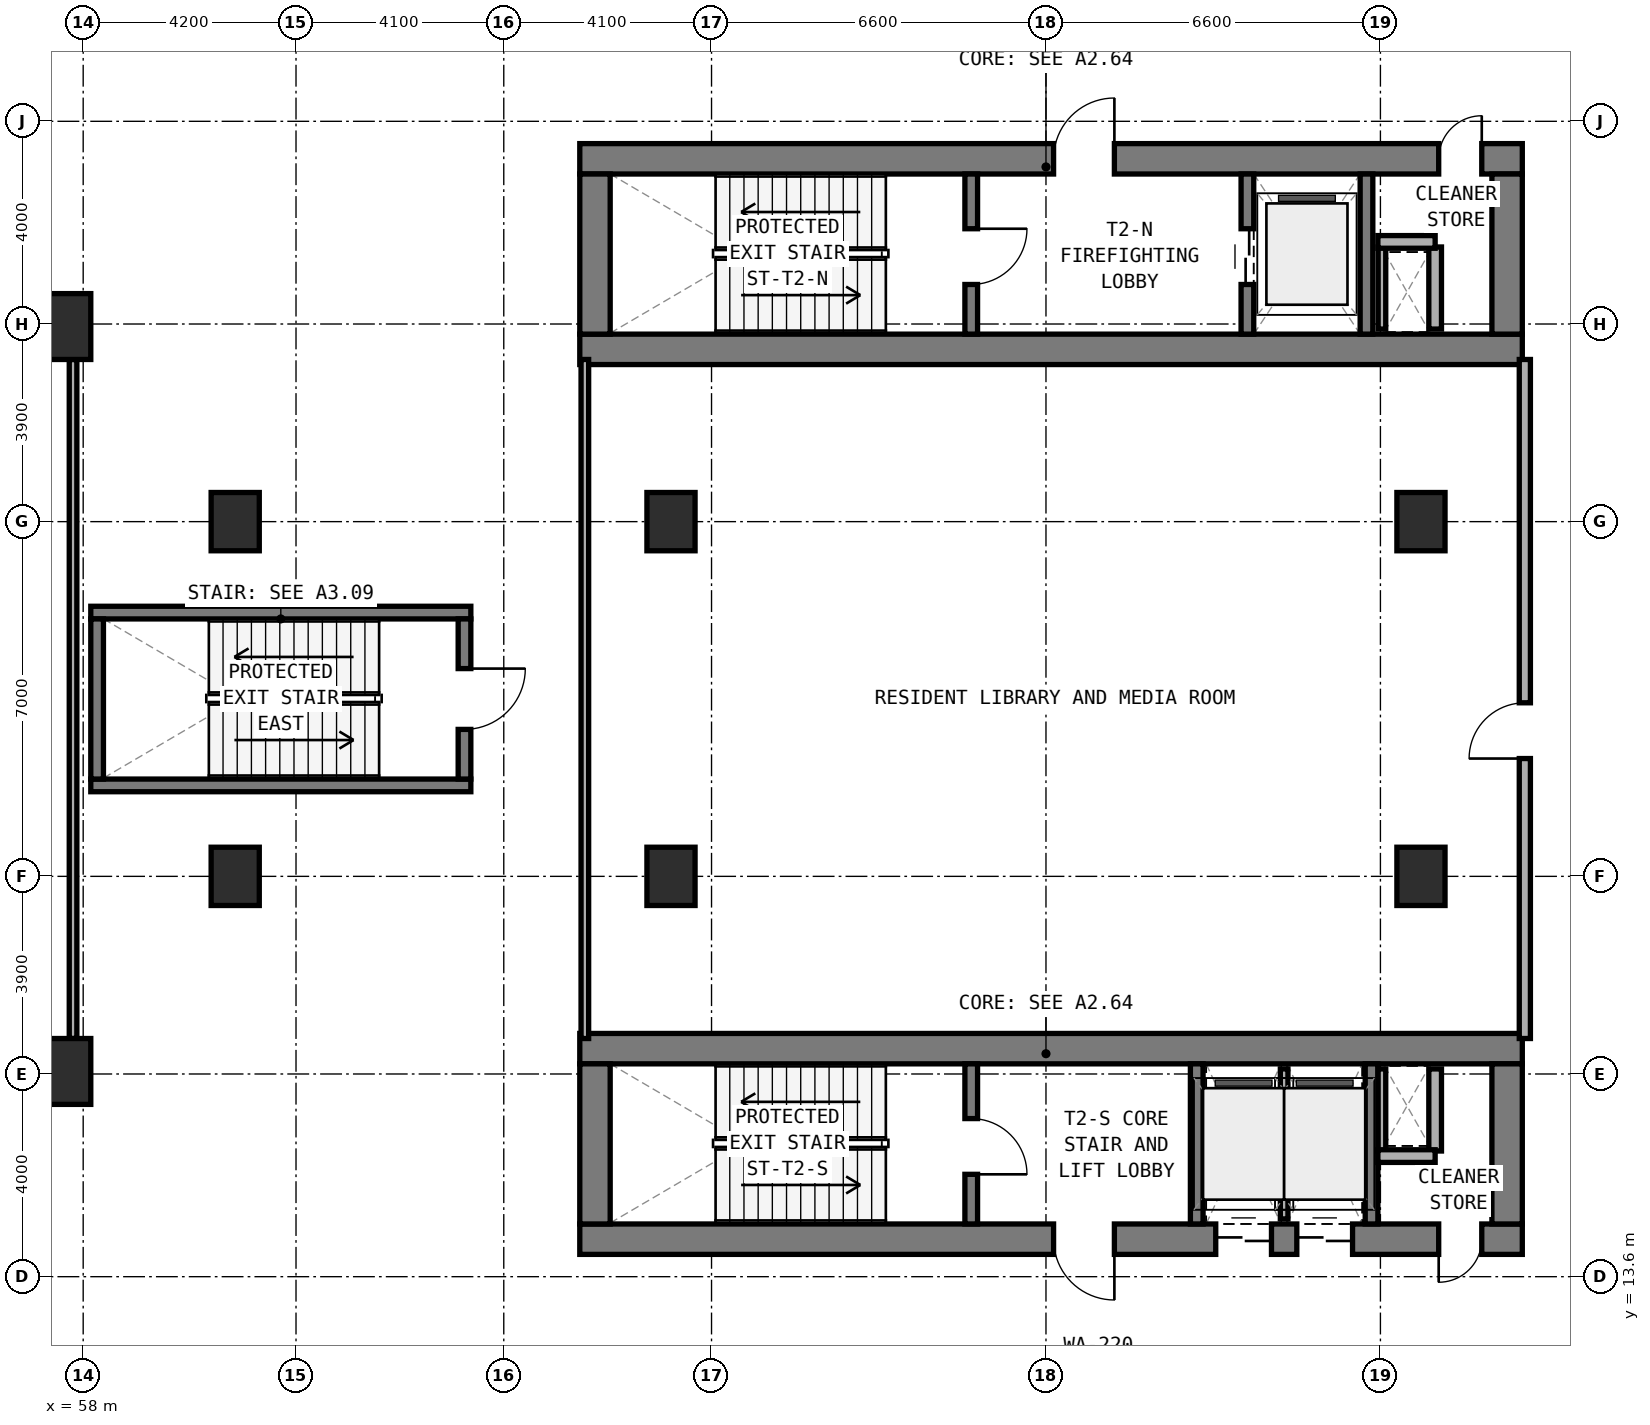
"""IFC4 building model, lengths in metres.
Left out: names, types, materials, properties, quantities, classifications, styles, units other than length and angle.
Written with IfcOpenShell. Run it as: python <this file> out.ifc"""

import sys

from ifc_helpers import new_model, si_unit, direction, frame, frame_2d, origin, origin_2d, place, context, subcontext, project, spatial, rectangle, extrude, element, fill, save


model = new_model("IFC4")
c1 = context("Model", 3, precision=1e-05, world=origin(), true_north=direction((0.0, 1.0)))
c2 = subcontext(c1, "Body", "Model", "MODEL_VIEW")
j1 = project(units=[si_unit("LENGTHUNIT", "METRE"), si_unit("PLANEANGLEUNIT", "RADIAN")], contexts=[c1])
p1 = place(None, origin())
s1 = spatial("IfcSite", under=j1, at=p1, CompositionType="ELEMENT")
p2 = place(p1, origin())
s2 = spatial("IfcBuilding", under=s1, at=p2, CompositionType="ELEMENT")
p3 = place(p2, frame((0.0, 0.0, 15.0)))
s3 = spatial("IfcBuildingStorey", under=s2, at=p3, CompositionType="ELEMENT", Elevation=15.0)
p4 = place(p3, frame((67.8, 31.9, 0.0), z_axis=(0.0, 0.0, 1.0), x_axis=(1.0, 0.0, 0.0)))
e1 = element("IfcWall", 1, at=p4, inside=s3, PredefinedType="SHEAR", context=c2, shape_type="SweptSolid", body=[
    extrude(rectangle(XDim=18.6, YDim=0.6, at=frame_2d((9.3, 0.0))), origin(), (0.0, 0.0, 1.0), 4.5),
])
p5 = place(p3, frame((67.8, 35.66, 0.0), z_axis=(0.0, 0.0, 1.0), x_axis=(1.0, 0.0, 0.0)))
e2 = element("IfcWall", 2, at=p5, inside=s3, PredefinedType="SHEAR", context=c2, shape_type="SweptSolid", body=[
    extrude(rectangle(XDim=18.6, YDim=0.6, at=frame_2d((9.3, 0.0))), origin(), (0.0, 0.0, 1.0), 4.5),
])
p6 = place(p5, frame((9.35, 0.0, 0.0)))
e3 = element("IfcOpeningElement", 3, at=p6, cuts=e2, PredefinedType="OPENING", context=c2, shape_type="SweptSolid", body=[
    extrude(rectangle(XDim=1.2, YDim=2.15, at=frame_2d((0.6, 1.075))), frame((0.0, 0.31, 0.0), z_axis=(0.0, -1.0, 0.0), x_axis=(1.0, 0.0, 0.0)), (0.0, 0.0, 1.0), 0.62),
])
p7 = place(p5, frame((16.95, 0.0, 0.0)))
e4 = element("IfcOpeningElement", 4, at=p7, cuts=e2, PredefinedType="OPENING", context=c2, shape_type="SweptSolid", body=[
    extrude(rectangle(XDim=0.85, YDim=2.1, at=frame_2d((0.425, 1.05))), frame((0.0, 0.31, 0.0), z_axis=(0.0, -1.0, 0.0), x_axis=(1.0, 0.0, 0.0)), (0.0, 0.0, 1.0), 0.62),
])
for number, where, z_axis, x_axis in (
    (5, (68.1, 32.2, 0.0), (0.0, 0.0, 1.0), (0.0, 1.0, 0.0)),
    (6, (86.1, 32.2, 0.0), (0.0, 0.0, 1.0), (0.0, 1.0, 0.0)),
):
    element("IfcWall", number, at=place(p3, frame(where, z_axis=z_axis, x_axis=x_axis)), inside=s3, PredefinedType="SHEAR", context=c2, shape_type="SweptSolid", body=[
        extrude(rectangle(XDim=3.16, YDim=0.6, at=frame_2d((1.58, 0.0))), origin(), (0.0, 0.0, 1.0), 4.5),
    ])
p8 = place(p3, frame((75.525, 32.2, 0.0), z_axis=(0.0, 0.0, 1.0), x_axis=(0.0, 1.0, 0.0)))
e7 = element("IfcWall", 7, at=p8, inside=s3, PredefinedType="STANDARD", context=c2, shape_type="SweptSolid", body=[
    extrude(rectangle(XDim=3.16, YDim=0.25, at=frame_2d((1.58, 0.0))), origin(), (0.0, 0.0, 1.0), 4.1),
])
p9 = place(p8, frame((0.98, 0.0, 0.0)))
e8 = element("IfcOpeningElement", 8, at=p9, cuts=e7, PredefinedType="OPENING", context=c2, shape_type="SweptSolid", body=[
    extrude(rectangle(XDim=1.1, YDim=2.15, at=frame_2d((0.55, 1.075))), frame((0.0, 0.135, 0.0), z_axis=(0.0, -1.0, 0.0), x_axis=(1.0, 0.0, 0.0)), (0.0, 0.0, 1.0), 0.27),
])
p10 = place(p3, frame((80.975, 32.2, 0.0), z_axis=(0.0, 0.0, 1.0), x_axis=(0.0, 1.0, 0.0)))
e9 = element("IfcWall", 9, at=p10, inside=s3, PredefinedType="STANDARD", context=c2, shape_type="SweptSolid", body=[
    extrude(rectangle(XDim=3.16, YDim=0.25, at=frame_2d((1.58, 0.0))), origin(), (0.0, 0.0, 1.0), 4.1),
])
p11 = place(p10, frame((0.98, 0.0, 0.0)))
e10 = element("IfcOpeningElement", 10, at=p11, cuts=e9, PredefinedType="OPENING", context=c2, shape_type="SweptSolid", body=[
    extrude(rectangle(XDim=1.1, YDim=2.15, at=frame_2d((0.55, 1.075))), frame((0.0, 0.135, 0.0), z_axis=(0.0, -1.0, 0.0), x_axis=(1.0, 0.0, 0.0)), (0.0, 0.0, 1.0), 0.27),
])
p12 = place(p3, frame((83.325, 32.2, 0.0), z_axis=(0.0, 0.0, 1.0), x_axis=(0.0, 1.0, 0.0)))
e11 = element("IfcWall", 11, at=p12, inside=s3, PredefinedType="STANDARD", context=c2, shape_type="SweptSolid", body=[
    extrude(rectangle(XDim=3.16, YDim=0.25, at=frame_2d((1.58, 0.0))), origin(), (0.0, 0.0, 1.0), 4.1),
])
p13 = place(p3, frame((67.8, 14.34, 0.0), z_axis=(0.0, 0.0, 1.0), x_axis=(1.0, 0.0, 0.0)))
e12 = element("IfcWall", 12, at=p13, inside=s3, PredefinedType="SHEAR", context=c2, shape_type="SweptSolid", body=[
    extrude(rectangle(XDim=18.6, YDim=0.6, at=frame_2d((9.3, 0.0))), origin(), (0.0, 0.0, 1.0), 4.5),
])
p14 = place(p13, frame((9.35, 0.0, 0.0)))
e13 = element("IfcOpeningElement", 13, at=p14, cuts=e12, PredefinedType="OPENING", context=c2, shape_type="SweptSolid", body=[
    extrude(rectangle(XDim=1.2, YDim=2.15, at=frame_2d((0.6, 1.075))), frame((0.0, 0.31, 0.0), z_axis=(0.0, -1.0, 0.0), x_axis=(1.0, 0.0, 0.0)), (0.0, 0.0, 1.0), 0.62),
])
p15 = place(p13, frame((16.95, 0.0, 0.0)))
e14 = element("IfcOpeningElement", 14, at=p15, cuts=e12, PredefinedType="OPENING", context=c2, shape_type="SweptSolid", body=[
    extrude(rectangle(XDim=0.85, YDim=2.1, at=frame_2d((0.425, 1.05))), frame((0.0, 0.31, 0.0), z_axis=(0.0, -1.0, 0.0), x_axis=(1.0, 0.0, 0.0)), (0.0, 0.0, 1.0), 0.62),
])
p16 = place(p13, frame((12.55, 0.0, 0.0)))
e15 = element("IfcOpeningElement", 15, at=p16, cuts=e12, PredefinedType="OPENING", context=c2, shape_type="SweptSolid", body=[
    extrude(rectangle(XDim=1.1, YDim=2.15, at=frame_2d((0.55, 1.075))), frame((0.0, 0.31, 0.0), z_axis=(0.0, -1.0, 0.0), x_axis=(1.0, 0.0, 0.0)), (0.0, 0.0, 1.0), 0.62),
])
p17 = place(p13, frame((14.15, 0.0, 0.0)))
e16 = element("IfcOpeningElement", 16, at=p17, cuts=e12, PredefinedType="OPENING", context=c2, shape_type="SweptSolid", body=[
    extrude(rectangle(XDim=1.1, YDim=2.15, at=frame_2d((0.55, 1.075))), frame((0.0, 0.31, 0.0), z_axis=(0.0, -1.0, 0.0), x_axis=(1.0, 0.0, 0.0)), (0.0, 0.0, 1.0), 0.62),
])
p18 = place(p3, frame((67.8, 18.1, 0.0), z_axis=(0.0, 0.0, 1.0), x_axis=(1.0, 0.0, 0.0)))
e17 = element("IfcWall", 17, at=p18, inside=s3, PredefinedType="SHEAR", context=c2, shape_type="SweptSolid", body=[
    extrude(rectangle(XDim=18.6, YDim=0.6, at=frame_2d((9.3, 0.0))), origin(), (0.0, 0.0, 1.0), 4.5),
])
for number, where, z_axis, x_axis in (
    (18, (68.1, 14.64, 0.0), (0.0, 0.0, 1.0), (0.0, 1.0, 0.0)),
    (19, (86.1, 14.64, 0.0), (0.0, 0.0, 1.0), (0.0, 1.0, 0.0)),
):
    element("IfcWall", number, at=place(p3, frame(where, z_axis=z_axis, x_axis=x_axis)), inside=s3, PredefinedType="SHEAR", context=c2, shape_type="SweptSolid", body=[
        extrude(rectangle(XDim=3.16, YDim=0.6, at=frame_2d((1.58, 0.0))), origin(), (0.0, 0.0, 1.0), 4.5),
    ])
p19 = place(p3, frame((75.525, 14.64, 0.0), z_axis=(0.0, 0.0, 1.0), x_axis=(0.0, 1.0, 0.0)))
e20 = element("IfcWall", 20, at=p19, inside=s3, PredefinedType="STANDARD", context=c2, shape_type="SweptSolid", body=[
    extrude(rectangle(XDim=3.16, YDim=0.25, at=frame_2d((1.58, 0.0))), origin(), (0.0, 0.0, 1.0), 4.1),
])
p20 = place(p19, frame((0.98, 0.0, 0.0)))
e21 = element("IfcOpeningElement", 21, at=p20, cuts=e20, PredefinedType="OPENING", context=c2, shape_type="SweptSolid", body=[
    extrude(rectangle(XDim=1.1, YDim=2.15, at=frame_2d((0.55, 1.075))), frame((0.0, 0.135, 0.0), z_axis=(0.0, -1.0, 0.0), x_axis=(1.0, 0.0, 0.0)), (0.0, 0.0, 1.0), 0.27),
])
for number, where, z_axis, x_axis in (
    (22, (79.975, 14.64, 0.0), (0.0, 0.0, 1.0), (0.0, 1.0, 0.0)),
    (23, (83.425, 14.64, 0.0), (0.0, 0.0, 1.0), (0.0, 1.0, 0.0)),
):
    element("IfcWall", number, at=place(p3, frame(where, z_axis=z_axis, x_axis=x_axis)), inside=s3, PredefinedType="STANDARD", context=c2, shape_type="SweptSolid", body=[
        extrude(rectangle(XDim=3.16, YDim=0.25, at=frame_2d((1.58, 0.0))), origin(), (0.0, 0.0, 1.0), 4.1),
    ])
for number, where, z_axis, x_axis in (
    (24, (58.15, 23.295, 0.0), (0.0, 0.0, 1.0), (1.0, 0.0, 0.0)),
    (25, (58.15, 26.705, 0.0), (0.0, 0.0, 1.0), (1.0, 0.0, 0.0)),
):
    element("IfcWall", number, at=place(p3, frame(where, z_axis=z_axis, x_axis=x_axis)), inside=s3, PredefinedType="STANDARD", context=c2, shape_type="SweptSolid", body=[
        extrude(rectangle(XDim=7.5, YDim=0.25, at=frame_2d((3.75, 0.0))), origin(), (0.0, 0.0, 1.0), 4.5),
    ])
p21 = place(p3, frame((58.275, 23.42, 0.0), z_axis=(0.0, 0.0, 1.0), x_axis=(0.0, 1.0, 0.0)))
e26 = element("IfcWall", 26, at=p21, inside=s3, PredefinedType="STANDARD", context=c2, shape_type="SweptSolid", body=[
    extrude(rectangle(XDim=3.16, YDim=0.25, at=frame_2d((1.58, 0.0))), origin(), (0.0, 0.0, 1.0), 4.5),
])
p22 = place(p3, frame((65.525, 23.42, 0.0), z_axis=(0.0, 0.0, 1.0), x_axis=(0.0, 1.0, 0.0)))
e27 = element("IfcWall", 27, at=p22, inside=s3, PredefinedType="STANDARD", context=c2, shape_type="SweptSolid", body=[
    extrude(rectangle(XDim=3.16, YDim=0.25, at=frame_2d((1.58, 0.0))), origin(), (0.0, 0.0, 1.0), 4.5),
])
p23 = place(p22, frame((0.98, 0.0, 0.0)))
e28 = element("IfcOpeningElement", 28, at=p23, cuts=e27, PredefinedType="OPENING", context=c2, shape_type="SweptSolid", body=[
    extrude(rectangle(XDim=1.2, YDim=2.15, at=frame_2d((0.6, 1.075))), frame((0.0, 0.135, 0.0), z_axis=(0.0, -1.0, 0.0), x_axis=(1.0, 0.0, 0.0)), (0.0, 0.0, 1.0), 0.27),
])
for number, where, z_axis, x_axis in (
    (29, (61.0, 21.5, 0.0), (0.0, 0.0, 1.0), (1.0, 0.0, 0.0)),
    (30, (61.0, 28.5, 0.0), (0.0, 0.0, 1.0), (1.0, 0.0, 0.0)),
    (31, (69.6, 21.5, 0.0), (0.0, 0.0, 1.0), (1.0, 0.0, 0.0)),
    (32, (69.6, 28.5, 0.0), (0.0, 0.0, 1.0), (1.0, 0.0, 0.0)),
    (33, (84.4, 21.5, 0.0), (0.0, 0.0, 1.0), (1.0, 0.0, 0.0)),
    (34, (84.4, 28.5, 0.0), (0.0, 0.0, 1.0), (1.0, 0.0, 0.0)),
):
    element("IfcColumn", number, at=place(p3, frame(where, z_axis=z_axis, x_axis=x_axis)), inside=s3, PredefinedType="COLUMN", context=c2, shape_type="SweptSolid", body=[
        extrude(rectangle(XDim=0.95, YDim=1.15, at=origin_2d()), origin(), (0.0, 0.0, 1.0), 4.5),
    ])
for number, where, z_axis, x_axis in (
    (35, (57.6, 17.65, 0.0), (0.0, 0.0, 1.0), (1.0, 0.0, 0.0)),
    (36, (57.6, 32.35, 0.0), (0.0, 0.0, 1.0), (1.0, 0.0, 0.0)),
):
    element("IfcColumn", number, at=place(p3, frame(where, z_axis=z_axis, x_axis=x_axis)), inside=s3, PredefinedType="COLUMN", context=c2, shape_type="SweptSolid", body=[
        extrude(rectangle(XDim=1.1, YDim=1.3, at=origin_2d()), origin(), (0.0, 0.0, 1.0), 4.5),
    ])
p24 = place(p3, frame((83.63, 32.3, 0.0), z_axis=(0.0, 0.0, 1.0), x_axis=(0.0, 1.0, 0.0)))
e37 = element("IfcWall", 37, at=p24, inside=s3, PredefinedType="PARTITIONING", context=c2, shape_type="SweptSolid", body=[
    extrude(rectangle(XDim=1.62, YDim=0.15, at=frame_2d((0.81, 0.0))), origin(), (0.0, 0.0, 1.0), 3.575),
])
p25 = place(p3, frame((84.68, 32.3, 0.0), z_axis=(0.0, 0.0, 1.0), x_axis=(0.0, 1.0, 0.0)))
e38 = element("IfcWall", 38, at=p25, inside=s3, PredefinedType="SOLIDWALL", context=c2, shape_type="SweptSolid", body=[
    extrude(rectangle(XDim=1.62, YDim=0.25, at=frame_2d((0.81, 0.0))), origin(), (0.0, 0.0, 1.0), 4.1),
])
p26 = place(p3, frame((83.55, 34.02, 0.0), z_axis=(0.0, 0.0, 1.0), x_axis=(1.0, 0.0, 0.0)))
e39 = element("IfcWall", 39, at=p26, inside=s3, PredefinedType="SOLIDWALL", context=c2, shape_type="SweptSolid", body=[
    extrude(rectangle(XDim=1.13, YDim=0.25, at=frame_2d((0.565, 0.0))), origin(), (0.0, 0.0, 1.0), 4.1),
])
p27 = place(p3, frame((83.63, 16.08, 0.0), z_axis=(0.0, 0.0, 1.0), x_axis=(0.0, 1.0, 0.0)))
e40 = element("IfcWall", 40, at=p27, inside=s3, PredefinedType="PARTITIONING", context=c2, shape_type="SweptSolid", body=[
    extrude(rectangle(XDim=1.62, YDim=0.15, at=frame_2d((0.81, 0.0))), origin(), (0.0, 0.0, 1.0), 3.575),
])
p28 = place(p3, frame((84.68, 16.08, 0.0), z_axis=(0.0, 0.0, 1.0), x_axis=(0.0, 1.0, 0.0)))
e41 = element("IfcWall", 41, at=p28, inside=s3, PredefinedType="SOLIDWALL", context=c2, shape_type="SweptSolid", body=[
    extrude(rectangle(XDim=1.62, YDim=0.25, at=frame_2d((0.81, 0.0))), origin(), (0.0, 0.0, 1.0), 4.1),
])
p29 = place(p3, frame((83.55, 15.98, 0.0), z_axis=(0.0, 0.0, 1.0), x_axis=(1.0, 0.0, 0.0)))
e42 = element("IfcWall", 42, at=p29, inside=s3, PredefinedType="SOLIDWALL", context=c2, shape_type="SweptSolid", body=[
    extrude(rectangle(XDim=1.13, YDim=0.25, at=frame_2d((0.565, 0.0))), origin(), (0.0, 0.0, 1.0), 4.1),
])
p30 = place(p3, frame((81.7, 14.74, 0.0), z_axis=(0.0, 0.0, 1.0), x_axis=(0.0, 1.0, 0.0)))
e43 = element("IfcWall", 43, at=p30, inside=s3, PredefinedType="PARTITIONING", context=c2, shape_type="SweptSolid", body=[
    extrude(rectangle(XDim=2.96, YDim=0.15, at=frame_2d((1.48, 0.0))), origin(), (0.0, 0.0, 1.0), 4.1),
])
p31 = place(p3, frame((57.8, 18.3, 0.0), z_axis=(0.0, 0.0, 1.0), x_axis=(0.0, 1.0, 0.0)))
e44 = element("IfcWall", 44, at=p31, inside=s3, PredefinedType="PARTITIONING", context=c2, shape_type="SweptSolid", body=[
    extrude(rectangle(XDim=13.4, YDim=0.15, at=frame_2d((6.7, 0.0))), origin(), (0.0, 0.0, 1.0), 3.375),
])
for number, where, z_axis, x_axis in (
    (45, (41.1, 18.2, 0.0), (0.0, 0.0, 1.0), (1.0, 0.0, 0.0)),
    (46, (41.1, 31.8, 0.0), (0.0, 0.0, 1.0), (1.0, 0.0, 0.0)),
):
    element("IfcWall", number, at=place(p3, frame(where, z_axis=z_axis, x_axis=x_axis)), inside=s3, PredefinedType="PARTITIONING", context=c2, shape_type="SweptSolid", body=[
        extrude(rectangle(XDim=16.6, YDim=0.15, at=frame_2d((8.3, 0.0))), origin(), (0.0, 0.0, 1.0), 3.375),
    ])
p32 = place(p3, frame((67.9, 18.3, 0.0), z_axis=(0.0, 0.0, 1.0), x_axis=(0.0, 1.0, 0.0)))
e47 = element("IfcWall", 47, at=p32, inside=s3, PredefinedType="PARTITIONING", context=c2, shape_type="SweptSolid", body=[
    extrude(rectangle(XDim=13.4, YDim=0.15, at=frame_2d((6.7, 0.0))), origin(), (0.0, 0.0, 1.0), 3.575),
])
p33 = place(p3, frame((86.45, 18.3, 0.0), z_axis=(0.0, 0.0, 1.0), x_axis=(0.0, 1.0, 0.0)))
e48 = element("IfcWall", 48, at=p33, inside=s3, PredefinedType="SOLIDWALL", context=c2, shape_type="SweptSolid", body=[
    extrude(rectangle(XDim=13.4, YDim=0.22, at=frame_2d((6.7, 0.0))), origin(), (0.0, 0.0, 1.0), 3.575),
])
p34 = place(p33, frame((5.525, 0.0, 0.0)))
e49 = element("IfcOpeningElement", 49, at=p34, cuts=e48, PredefinedType="OPENING", context=c2, shape_type="SweptSolid", body=[
    extrude(rectangle(XDim=1.1, YDim=2.1, at=frame_2d((0.55, 1.05))), frame((0.0, 0.12, 0.0), z_axis=(0.0, -1.0, 0.0), x_axis=(1.0, 0.0, 0.0)), (0.0, 0.0, 1.0), 0.24),
])
p35 = place(p9, frame((1.1, 0.0, 0.0), z_axis=(0.0, 0.0, 1.0), x_axis=(-1.0, 0.0, 0.0)))
e50 = element("IfcDoor", 50, at=p35, inside=s3, OperationType="SINGLE_SWING_LEFT", PredefinedType="DOOR", context=c2, shape_type="SweptSolid", body=[
    extrude(rectangle(XDim=1.1, YDim=2.15, at=frame_2d((0.55, 1.075))), frame((0.0, 0.025, 0.0), z_axis=(0.0, -1.0, 0.0), x_axis=(1.0, 0.0, 0.0)), (0.0, 0.0, 1.0), 0.05),
])
fill(e8, e50)
p36 = place(p6, origin())
e51 = element("IfcDoor", 51, at=p36, inside=s3, OperationType="SINGLE_SWING_RIGHT", PredefinedType="DOOR", context=c2, shape_type="SweptSolid", body=[
    extrude(rectangle(XDim=1.2, YDim=2.15, at=frame_2d((0.6, 1.075))), frame((0.0, 0.025, 0.0), z_axis=(0.0, -1.0, 0.0), x_axis=(1.0, 0.0, 0.0)), (0.0, 0.0, 1.0), 0.05),
])
fill(e3, e51)
p37 = place(p11, origin())
e52 = element("IfcDoor", 52, at=p37, inside=s3, OperationType="DOUBLE_DOOR_SLIDING", PredefinedType="DOOR", context=c2, shape_type="SweptSolid", body=[
    extrude(rectangle(XDim=1.1, YDim=2.15, at=frame_2d((0.55, 1.075))), frame((0.0, 0.025, 0.0), z_axis=(0.0, -1.0, 0.0), x_axis=(1.0, 0.0, 0.0)), (0.0, 0.0, 1.0), 0.05),
])
fill(e10, e52)
p38 = place(p7, origin())
e53 = element("IfcDoor", 53, at=p38, inside=s3, OperationType="SINGLE_SWING_RIGHT", PredefinedType="DOOR", context=c2, shape_type="SweptSolid", body=[
    extrude(rectangle(XDim=0.85, YDim=2.1, at=frame_2d((0.425, 1.05))), frame((0.0, 0.025, 0.0), z_axis=(0.0, -1.0, 0.0), x_axis=(1.0, 0.0, 0.0)), (0.0, 0.0, 1.0), 0.05),
])
fill(e4, e53)
p39 = place(p20, frame((1.1, 0.0, 0.0), z_axis=(0.0, 0.0, 1.0), x_axis=(-1.0, 0.0, 0.0)))
e54 = element("IfcDoor", 54, at=p39, inside=s3, OperationType="SINGLE_SWING_RIGHT", PredefinedType="DOOR", context=c2, shape_type="SweptSolid", body=[
    extrude(rectangle(XDim=1.1, YDim=2.15, at=frame_2d((0.55, 1.075))), frame((0.0, 0.025, 0.0), z_axis=(0.0, -1.0, 0.0), x_axis=(1.0, 0.0, 0.0)), (0.0, 0.0, 1.0), 0.05),
])
fill(e21, e54)
p40 = place(p14, frame((1.2, 0.0, 0.0), z_axis=(0.0, 0.0, 1.0), x_axis=(-1.0, 0.0, 0.0)))
e55 = element("IfcDoor", 55, at=p40, inside=s3, OperationType="SINGLE_SWING_LEFT", PredefinedType="DOOR", context=c2, shape_type="SweptSolid", body=[
    extrude(rectangle(XDim=1.2, YDim=2.15, at=frame_2d((0.6, 1.075))), frame((0.0, 0.025, 0.0), z_axis=(0.0, -1.0, 0.0), x_axis=(1.0, 0.0, 0.0)), (0.0, 0.0, 1.0), 0.05),
])
fill(e13, e55)
p41 = place(p15, frame((0.85, 0.0, 0.0), z_axis=(0.0, 0.0, 1.0), x_axis=(-1.0, 0.0, 0.0)))
e56 = element("IfcDoor", 56, at=p41, inside=s3, OperationType="SINGLE_SWING_RIGHT", PredefinedType="DOOR", context=c2, shape_type="SweptSolid", body=[
    extrude(rectangle(XDim=0.85, YDim=2.1, at=frame_2d((0.425, 1.05))), frame((0.0, 0.025, 0.0), z_axis=(0.0, -1.0, 0.0), x_axis=(1.0, 0.0, 0.0)), (0.0, 0.0, 1.0), 0.05),
])
fill(e14, e56)
p42 = place(p16, frame((1.1, 0.0, 0.0), z_axis=(0.0, 0.0, 1.0), x_axis=(-1.0, 0.0, 0.0)))
e57 = element("IfcDoor", 57, at=p42, inside=s3, OperationType="DOUBLE_DOOR_SLIDING", PredefinedType="DOOR", context=c2, shape_type="SweptSolid", body=[
    extrude(rectangle(XDim=1.1, YDim=2.15, at=frame_2d((0.55, 1.075))), frame((0.0, 0.025, 0.0), z_axis=(0.0, -1.0, 0.0), x_axis=(1.0, 0.0, 0.0)), (0.0, 0.0, 1.0), 0.05),
])
fill(e15, e57)
p43 = place(p17, frame((1.1, 0.0, 0.0), z_axis=(0.0, 0.0, 1.0), x_axis=(-1.0, 0.0, 0.0)))
e58 = element("IfcDoor", 58, at=p43, inside=s3, OperationType="DOUBLE_DOOR_SLIDING", PredefinedType="DOOR", context=c2, shape_type="SweptSolid", body=[
    extrude(rectangle(XDim=1.1, YDim=2.15, at=frame_2d((0.55, 1.075))), frame((0.0, 0.025, 0.0), z_axis=(0.0, -1.0, 0.0), x_axis=(1.0, 0.0, 0.0)), (0.0, 0.0, 1.0), 0.05),
])
fill(e16, e58)
p44 = place(p23, frame((1.2, 0.0, 0.0), z_axis=(0.0, 0.0, 1.0), x_axis=(-1.0, 0.0, 0.0)))
e59 = element("IfcDoor", 59, at=p44, inside=s3, OperationType="SINGLE_SWING_LEFT", PredefinedType="DOOR", context=c2, shape_type="SweptSolid", body=[
    extrude(rectangle(XDim=1.2, YDim=2.15, at=frame_2d((0.6, 1.075))), frame((0.0, 0.025, 0.0), z_axis=(0.0, -1.0, 0.0), x_axis=(1.0, 0.0, 0.0)), (0.0, 0.0, 1.0), 0.05),
])
fill(e28, e59)
p45 = place(p34, origin())
e60 = element("IfcDoor", 60, at=p45, inside=s3, OperationType="SINGLE_SWING_LEFT", PredefinedType="DOOR", context=c2, shape_type="SweptSolid", body=[
    extrude(rectangle(XDim=1.1, YDim=2.1, at=frame_2d((0.55, 1.05))), frame((0.0, 0.025, 0.0), z_axis=(0.0, -1.0, 0.0), x_axis=(1.0, 0.0, 0.0)), (0.0, 0.0, 1.0), 0.05),
])
fill(e49, e60)
save(model, sys.argv[1])
